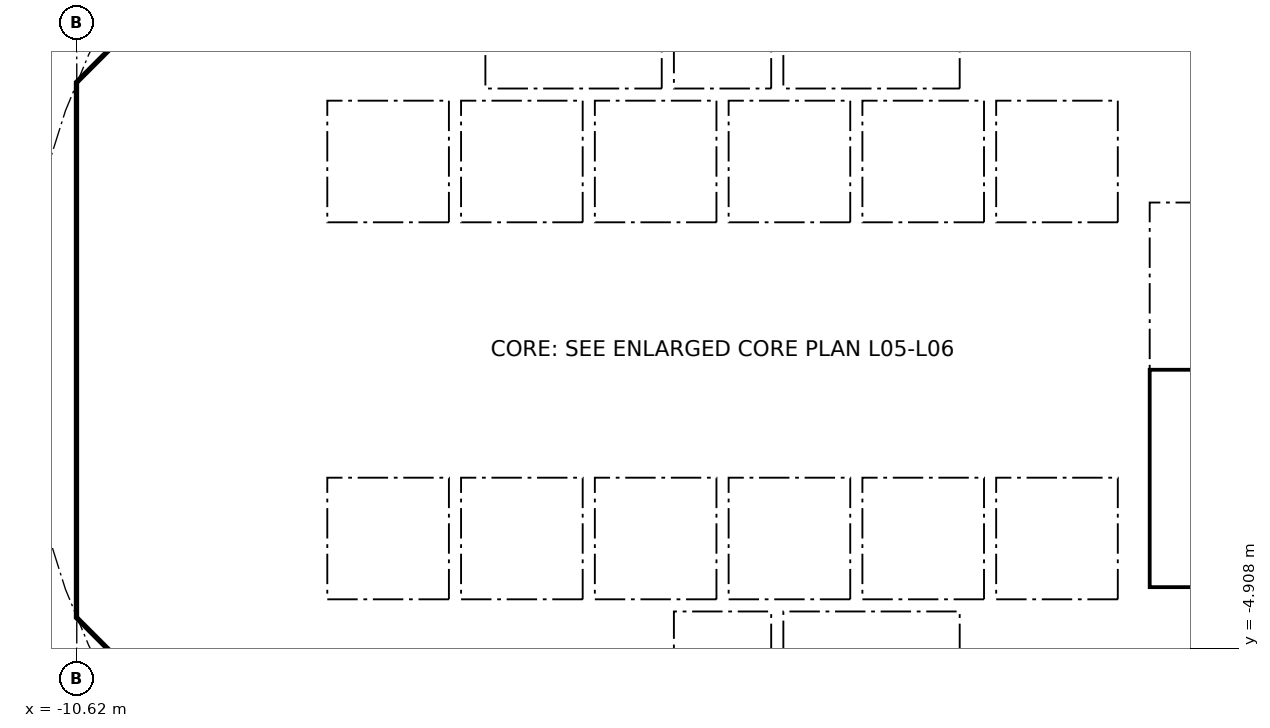
"""IFC4 building model, lengths in metres.
Left out: names, types, materials, properties, quantities, classifications, styles, units other than length and angle.
Written with IfcOpenShell. Run it as: python <this file> out.ifc"""

import sys

from ifc_helpers import new_model, si_unit, direction, frame, frame_2d, origin, place, context, subcontext, project, spatial, polyline, rectangle, outline, extrude, element, fill, save


model = new_model("IFC4")
c1 = context("Model", 3, precision=1e-05, world=origin(), true_north=direction((0.0, 1.0)))
c2 = subcontext(c1, "Body", "Model", "MODEL_VIEW")
j1 = project(units=[si_unit("LENGTHUNIT", "METRE"), si_unit("PLANEANGLEUNIT", "RADIAN")], contexts=[c1])
p1 = place(None, origin())
s1 = spatial("IfcSite", under=j1, at=p1, CompositionType="ELEMENT")
p2 = place(p1, origin())
s2 = spatial("IfcBuilding", under=s1, at=p2, CompositionType="ELEMENT")
p3 = place(p2, frame((0.0, 0.0, 30.7)))
s3 = spatial("IfcBuildingStorey", under=s2, at=p3, CompositionType="ELEMENT", Elevation=30.7)
p4 = place(p3, frame((9.988, 4.613, 0.0), z_axis=(0.0, 0.0, 1.0), x_axis=(-0.707106781187, 0.707106781187, 0.0)))
e1 = element("IfcWall", 1, at=p4, inside=s3, PredefinedType="SHEAR", context=c2, shape_type="SweptSolid", body=[
    extrude(rectangle(XDim=7.602, YDim=0.6, at=frame_2d((3.801, 0.0))), origin(), (0.0, 0.0, 1.0), 3.44),
])
p5 = place(p4, frame((3.201, 0.0, 0.0)))
e2 = element("IfcOpeningElement", 2, at=p5, cuts=e1, PredefinedType="OPENING", context=c2, shape_type="SweptSolid", body=[
    extrude(rectangle(XDim=1.2, YDim=2.1, at=frame_2d((0.6, 1.05))), frame((0.0, 0.31, 0.0), z_axis=(0.0, -1.0, 0.0), x_axis=(1.0, 0.0, 0.0)), (0.0, 0.0, 1.0), 0.62),
])
p6 = place(p3, frame((-4.613, 9.988, 0.0), z_axis=(0.0, 0.0, 1.0), x_axis=(-0.707106781187, -0.707106781187, 0.0)))
e3 = element("IfcWall", 3, at=p6, inside=s3, PredefinedType="SHEAR", context=c2, shape_type="SweptSolid", body=[
    extrude(rectangle(XDim=7.602, YDim=0.6, at=frame_2d((3.801, 0.0))), origin(), (0.0, 0.0, 1.0), 3.44),
])
p7 = place(p6, frame((0.351, 0.0, 0.0)))
e4 = element("IfcOpeningElement", 4, at=p7, cuts=e3, PredefinedType="OPENING", context=c2, shape_type="SweptSolid", body=[
    extrude(rectangle(XDim=1.1, YDim=2.1, at=frame_2d((0.55, 1.05))), frame((0.0, 0.31, 0.0), z_axis=(0.0, -1.0, 0.0), x_axis=(1.0, 0.0, 0.0)), (0.0, 0.0, 1.0), 0.62),
])
p8 = place(p3, frame((-10.325, 3.801, 0.0), z_axis=(0.0, 0.0, 1.0), x_axis=(0.0, -1.0, 0.0)))
e5 = element("IfcWall", 5, at=p8, inside=s3, PredefinedType="SHEAR", context=c2, shape_type="SweptSolid", body=[
    extrude(rectangle(XDim=7.602, YDim=0.6, at=frame_2d((3.801, 0.0))), origin(), (0.0, 0.0, 1.0), 3.44),
])
p9 = place(p8, frame((0.651, 0.0, 0.0)))
e6 = element("IfcOpeningElement", 6, at=p9, cuts=e5, PredefinedType="OPENING", context=c2, shape_type="SweptSolid", body=[
    extrude(rectangle(XDim=1.5, YDim=2.1, at=frame_2d((0.75, 1.05))), frame((0.0, 0.31, 0.0), z_axis=(0.0, -1.0, 0.0), x_axis=(1.0, 0.0, 0.0)), (0.0, 0.0, 1.0), 0.62),
])
p10 = place(p8, frame((5.451, 0.0, 0.0)))
e7 = element("IfcOpeningElement", 7, at=p10, cuts=e5, PredefinedType="OPENING", context=c2, shape_type="SweptSolid", body=[
    extrude(rectangle(XDim=1.5, YDim=2.1, at=frame_2d((0.75, 1.05))), frame((0.0, 0.31, 0.0), z_axis=(0.0, -1.0, 0.0), x_axis=(1.0, 0.0, 0.0)), (0.0, 0.0, 1.0), 0.62),
])
p11 = place(p3, frame((-9.988, -4.613, 0.0), z_axis=(0.0, 0.0, 1.0), x_axis=(0.707106781187, -0.707106781187, 0.0)))
e8 = element("IfcWall", 8, at=p11, inside=s3, PredefinedType="SHEAR", context=c2, shape_type="SweptSolid", body=[
    extrude(rectangle(XDim=7.602, YDim=0.6, at=frame_2d((3.801, 0.0))), origin(), (0.0, 0.0, 1.0), 3.44),
])
p12 = place(p11, frame((6.151, 0.0, 0.0)))
e9 = element("IfcOpeningElement", 9, at=p12, cuts=e8, PredefinedType="OPENING", context=c2, shape_type="SweptSolid", body=[
    extrude(rectangle(XDim=1.1, YDim=2.1, at=frame_2d((0.55, 1.05))), frame((0.0, 0.31, 0.0), z_axis=(0.0, -1.0, 0.0), x_axis=(1.0, 0.0, 0.0)), (0.0, 0.0, 1.0), 0.62),
])
p13 = place(p3, frame((4.613, -9.988, 0.0), z_axis=(0.0, 0.0, 1.0), x_axis=(0.707106781187, 0.707106781187, 0.0)))
e10 = element("IfcWall", 10, at=p13, inside=s3, PredefinedType="SHEAR", context=c2, shape_type="SweptSolid", body=[
    extrude(rectangle(XDim=7.602, YDim=0.6, at=frame_2d((3.801, 0.0))), origin(), (0.0, 0.0, 1.0), 3.44),
])
p14 = place(p13, frame((3.201, 0.0, 0.0)))
e11 = element("IfcOpeningElement", 11, at=p14, cuts=e10, PredefinedType="OPENING", context=c2, shape_type="SweptSolid", body=[
    extrude(rectangle(XDim=1.2, YDim=2.1, at=frame_2d((0.6, 1.05))), frame((0.0, 0.31, 0.0), z_axis=(0.0, -1.0, 0.0), x_axis=(1.0, 0.0, 0.0)), (0.0, 0.0, 1.0), 0.62),
])
p15 = place(p3, frame((-5.8, 4.3, 0.0), z_axis=(0.0, 0.0, 1.0), x_axis=(0.0, 1.0, 0.0)))
e12 = element("IfcWall", 12, at=p15, inside=s3, PredefinedType="PARTITIONING", context=c2, shape_type="SweptSolid", body=[
    extrude(rectangle(XDim=3.927, YDim=0.15, at=frame_2d((1.963, 0.0))), origin(), (0.0, 0.0, 1.0), 3.44),
])
p16 = place(p15, frame((0.413, 0.0, 0.0)))
e13 = element("IfcOpeningElement", 13, at=p16, cuts=e12, PredefinedType="OPENING", context=c2, shape_type="SweptSolid", body=[
    extrude(rectangle(XDim=0.9, YDim=2.1, at=frame_2d((0.45, 1.05))), frame((0.0, 0.085, 0.0), z_axis=(0.0, -1.0, 0.0), x_axis=(1.0, 0.0, 0.0)), (0.0, 0.0, 1.0), 0.17),
])
p17 = place(p15, frame((2.489, 0.0, 0.0)))
e14 = element("IfcOpeningElement", 14, at=p17, cuts=e12, PredefinedType="OPENING", context=c2, shape_type="SweptSolid", body=[
    extrude(rectangle(XDim=0.9, YDim=2.1, at=frame_2d((0.45, 1.05))), frame((0.0, 0.085, 0.0), z_axis=(0.0, -1.0, 0.0), x_axis=(1.0, 0.0, 0.0)), (0.0, 0.0, 1.0), 0.17),
])
p18 = place(p3, frame((4.0, 4.3, 0.0), z_axis=(0.0, 0.0, 1.0), x_axis=(0.0, 1.0, 0.0)))
e15 = element("IfcWall", 15, at=p18, inside=s3, PredefinedType="SOLIDWALL", context=c2, shape_type="SweptSolid", body=[
    extrude(rectangle(XDim=2.2, YDim=0.2, at=frame_2d((1.1, 0.0))), origin(), (0.0, 0.0, 1.0), 3.44),
])
p19 = place(p18, frame((0.55, 0.0, 0.0)))
e16 = element("IfcOpeningElement", 16, at=p19, cuts=e15, PredefinedType="OPENING", context=c2, shape_type="SweptSolid", body=[
    extrude(rectangle(XDim=1.1, YDim=2.1, at=frame_2d((0.55, 1.05))), frame((0.0, 0.11, 0.0), z_axis=(0.0, -1.0, 0.0), x_axis=(1.0, 0.0, 0.0)), (0.0, 0.0, 1.0), 0.22),
])
p20 = place(p3, frame((-4.0, 4.3, 0.0), z_axis=(0.0, 0.0, 1.0), x_axis=(0.0, 1.0, 0.0)))
e17 = element("IfcWall", 17, at=p20, inside=s3, PredefinedType="SOLIDWALL", context=c2, shape_type="SweptSolid", body=[
    extrude(rectangle(XDim=2.2, YDim=0.2, at=frame_2d((1.1, 0.0))), origin(), (0.0, 0.0, 1.0), 3.44),
])
p21 = place(p20, frame((0.55, 0.0, 0.0)))
e18 = element("IfcOpeningElement", 18, at=p21, cuts=e17, PredefinedType="OPENING", context=c2, shape_type="SweptSolid", body=[
    extrude(rectangle(XDim=1.1, YDim=2.1, at=frame_2d((0.55, 1.05))), frame((0.0, 0.11, 0.0), z_axis=(0.0, -1.0, 0.0), x_axis=(1.0, 0.0, 0.0)), (0.0, 0.0, 1.0), 0.22),
])
p22 = place(p3, frame((-6.7, 2.0, 0.0), z_axis=(0.0, 0.0, 1.0), x_axis=(1.0, 0.0, 0.0)))
e19 = element("IfcWall", 19, at=p22, inside=s3, PredefinedType="SOLIDWALL", context=c2, shape_type="SweptSolid", body=[
    extrude(rectangle(XDim=13.4, YDim=0.2, at=frame_2d((6.7, 0.0))), origin(), (0.0, 0.0, 1.0), 3.44),
])
p23 = place(p22, frame((0.65, 0.0, 0.0)))
e20 = element("IfcOpeningElement", 20, at=p23, cuts=e19, PredefinedType="OPENING", context=c2, shape_type="SweptSolid", body=[
    extrude(rectangle(XDim=1.1, YDim=2.1, at=frame_2d((0.55, 1.05))), frame((0.0, 0.11, 0.0), z_axis=(0.0, -1.0, 0.0), x_axis=(1.0, 0.0, 0.0)), (0.0, 0.0, 1.0), 0.22),
])
p24 = place(p22, frame((2.85, 0.0, 0.0)))
e21 = element("IfcOpeningElement", 21, at=p24, cuts=e19, PredefinedType="OPENING", context=c2, shape_type="SweptSolid", body=[
    extrude(rectangle(XDim=1.1, YDim=2.1, at=frame_2d((0.55, 1.05))), frame((0.0, 0.11, 0.0), z_axis=(0.0, -1.0, 0.0), x_axis=(1.0, 0.0, 0.0)), (0.0, 0.0, 1.0), 0.22),
])
p25 = place(p22, frame((5.05, 0.0, 0.0)))
e22 = element("IfcOpeningElement", 22, at=p25, cuts=e19, PredefinedType="OPENING", context=c2, shape_type="SweptSolid", body=[
    extrude(rectangle(XDim=1.1, YDim=2.1, at=frame_2d((0.55, 1.05))), frame((0.0, 0.11, 0.0), z_axis=(0.0, -1.0, 0.0), x_axis=(1.0, 0.0, 0.0)), (0.0, 0.0, 1.0), 0.22),
])
p26 = place(p3, frame((6.7, 4.0, 0.0), z_axis=(0.0, 0.0, 1.0), x_axis=(1.0, 0.0, 0.0)))
e23 = element("IfcWall", 23, at=p26, inside=s3, PredefinedType="SOLIDWALL", context=c2, shape_type="SweptSolid", body=[
    extrude(rectangle(XDim=3.325, YDim=0.2, at=frame_2d((1.662, 0.0))), origin(), (0.0, 0.0, 1.0), 3.44),
])
p27 = place(p26, frame((1.25, 0.0, 0.0)))
e24 = element("IfcOpeningElement", 24, at=p27, cuts=e23, PredefinedType="OPENING", context=c2, shape_type="SweptSolid", body=[
    extrude(rectangle(XDim=1.1, YDim=2.1, at=frame_2d((0.55, 1.05))), frame((0.0, 0.11, 0.0), z_axis=(0.0, -1.0, 0.0), x_axis=(1.0, 0.0, 0.0)), (0.0, 0.0, 1.0), 0.22),
])
p28 = place(p3, frame((-5.8, -8.227, 0.0), z_axis=(0.0, 0.0, 1.0), x_axis=(0.0, 1.0, 0.0)))
e25 = element("IfcWall", 25, at=p28, inside=s3, PredefinedType="PARTITIONING", context=c2, shape_type="SweptSolid", body=[
    extrude(rectangle(XDim=3.927, YDim=0.15, at=frame_2d((1.963, 0.0))), origin(), (0.0, 0.0, 1.0), 3.44),
])
p29 = place(p28, frame((2.615, 0.0, 0.0)))
e26 = element("IfcOpeningElement", 26, at=p29, cuts=e25, PredefinedType="OPENING", context=c2, shape_type="SweptSolid", body=[
    extrude(rectangle(XDim=0.9, YDim=2.1, at=frame_2d((0.45, 1.05))), frame((0.0, 0.085, 0.0), z_axis=(0.0, -1.0, 0.0), x_axis=(1.0, 0.0, 0.0)), (0.0, 0.0, 1.0), 0.17),
])
p30 = place(p28, frame((0.539, 0.0, 0.0)))
e27 = element("IfcOpeningElement", 27, at=p30, cuts=e25, PredefinedType="OPENING", context=c2, shape_type="SweptSolid", body=[
    extrude(rectangle(XDim=0.9, YDim=2.1, at=frame_2d((0.45, 1.05))), frame((0.0, 0.085, 0.0), z_axis=(0.0, -1.0, 0.0), x_axis=(1.0, 0.0, 0.0)), (0.0, 0.0, 1.0), 0.17),
])
p31 = place(p3, frame((4.0, -6.5, 0.0), z_axis=(0.0, 0.0, 1.0), x_axis=(0.0, 1.0, 0.0)))
e28 = element("IfcWall", 28, at=p31, inside=s3, PredefinedType="SOLIDWALL", context=c2, shape_type="SweptSolid", body=[
    extrude(rectangle(XDim=2.2, YDim=0.2, at=frame_2d((1.1, 0.0))), origin(), (0.0, 0.0, 1.0), 3.44),
])
p32 = place(p31, frame((0.55, 0.0, 0.0)))
e29 = element("IfcOpeningElement", 29, at=p32, cuts=e28, PredefinedType="OPENING", context=c2, shape_type="SweptSolid", body=[
    extrude(rectangle(XDim=1.1, YDim=2.1, at=frame_2d((0.55, 1.05))), frame((0.0, 0.11, 0.0), z_axis=(0.0, -1.0, 0.0), x_axis=(1.0, 0.0, 0.0)), (0.0, 0.0, 1.0), 0.22),
])
p33 = place(p3, frame((-4.0, -6.5, 0.0), z_axis=(0.0, 0.0, 1.0), x_axis=(0.0, 1.0, 0.0)))
e30 = element("IfcWall", 30, at=p33, inside=s3, PredefinedType="SOLIDWALL", context=c2, shape_type="SweptSolid", body=[
    extrude(rectangle(XDim=2.2, YDim=0.2, at=frame_2d((1.1, 0.0))), origin(), (0.0, 0.0, 1.0), 3.44),
])
p34 = place(p33, frame((0.65, 0.0, 0.0)))
e31 = element("IfcOpeningElement", 31, at=p34, cuts=e30, PredefinedType="OPENING", context=c2, shape_type="SweptSolid", body=[
    extrude(rectangle(XDim=0.9, YDim=2.1, at=frame_2d((0.45, 1.05))), frame((0.0, 0.11, 0.0), z_axis=(0.0, -1.0, 0.0), x_axis=(1.0, 0.0, 0.0)), (0.0, 0.0, 1.0), 0.22),
])
p35 = place(p3, frame((-6.7, -2.0, 0.0), z_axis=(0.0, 0.0, 1.0), x_axis=(1.0, 0.0, 0.0)))
e32 = element("IfcWall", 32, at=p35, inside=s3, PredefinedType="SOLIDWALL", context=c2, shape_type="SweptSolid", body=[
    extrude(rectangle(XDim=13.4, YDim=0.2, at=frame_2d((6.7, 0.0))), origin(), (0.0, 0.0, 1.0), 3.44),
])
p36 = place(p35, frame((0.65, 0.0, 0.0)))
e33 = element("IfcOpeningElement", 33, at=p36, cuts=e32, PredefinedType="OPENING", context=c2, shape_type="SweptSolid", body=[
    extrude(rectangle(XDim=1.1, YDim=2.1, at=frame_2d((0.55, 1.05))), frame((0.0, 0.11, 0.0), z_axis=(0.0, -1.0, 0.0), x_axis=(1.0, 0.0, 0.0)), (0.0, 0.0, 1.0), 0.22),
])
p37 = place(p35, frame((2.85, 0.0, 0.0)))
e34 = element("IfcOpeningElement", 34, at=p37, cuts=e32, PredefinedType="OPENING", context=c2, shape_type="SweptSolid", body=[
    extrude(rectangle(XDim=1.1, YDim=2.1, at=frame_2d((0.55, 1.05))), frame((0.0, 0.11, 0.0), z_axis=(0.0, -1.0, 0.0), x_axis=(1.0, 0.0, 0.0)), (0.0, 0.0, 1.0), 0.22),
])
p38 = place(p3, origin())
e35 = element("IfcWall", 35, at=p38, inside=s3, PredefinedType="SHEAR", context=c2, shape_type="SweptSolid", body=[
    extrude(outline(polyline([(-10.625, -3.801), (-10.025, -3.801), (-10.025, -4.152), (-9.776, -4.401), (-10.2, -4.825), (-10.625, -4.401), (-10.625, -3.801)])), origin(), (0.0, 0.0, 1.0), 3.44),
])
p39 = place(p3, origin())
e36 = element("IfcWall", 36, at=p39, inside=s3, PredefinedType="SHEAR", context=c2, shape_type="SweptSolid", body=[
    extrude(outline(polyline([(-10.2, 4.825), (-9.776, 4.401), (-10.025, 4.152), (-10.025, 3.801), (-10.625, 3.801), (-10.625, 4.401), (-10.2, 4.825)])), origin(), (0.0, 0.0, 1.0), 3.44),
])
for number, where, z_axis, x_axis in (
    (37, (-10.025, -4.0, 0.0), (0.0, 0.0, 1.0), (1.0, 0.0, 0.0)),
    (38, (-10.025, 4.0, 0.0), (0.0, 0.0, 1.0), (1.0, 0.0, 0.0)),
):
    element("IfcWall", number, at=place(p3, frame(where, z_axis=z_axis, x_axis=x_axis)), inside=s3, PredefinedType="PARTITIONING", context=c2, shape_type="SweptSolid", body=[
        extrude(rectangle(XDim=3.325, YDim=0.2, at=frame_2d((1.662, 0.0))), origin(), (0.0, 0.0, 1.0), 3.44),
    ])
for number, where, z_axis, x_axis in (
    (39, (-0.9, -6.5, 0.0), (0.0, 0.0, 1.0), (0.0, 1.0, 0.0)),
    (40, (0.9, -6.5, 0.0), (0.0, 0.0, 1.0), (0.0, 1.0, 0.0)),
):
    element("IfcWall", number, at=place(p3, frame(where, z_axis=z_axis, x_axis=x_axis)), inside=s3, PredefinedType="SOLIDWALL", context=c2, shape_type="SweptSolid", body=[
        extrude(rectangle(XDim=2.2, YDim=0.2, at=frame_2d((1.1, 0.0))), origin(), (0.0, 0.0, 1.0), 3.44),
    ])
p40 = place(p3, origin())
e41 = element("IfcWall", 41, at=p40, inside=s3, PredefinedType="SOLIDWALL", context=c2, shape_type="SweptSolid", body=[
    extrude(outline(polyline([(-6.7, -2.1), (-6.5, -2.1), (-6.5, -4.1), (-4.5, -4.1), (-4.5, -2.1), (-4.3, -2.1), (-4.3, -4.1), (-2.3, -4.1), (-2.3, -2.1), (-2.1, -2.1), (-2.1, -4.1), (-0.1, -4.1), (-0.1, -2.1), (0.1, -2.1), (0.1, -4.1), (2.1, -4.1), (2.1, -2.1), (2.3, -2.1), (2.3, -4.1), (4.3, -4.1), (4.3, -2.1), (4.5, -2.1), (4.5, -4.1), (6.5, -4.1), (6.5, -2.1), (6.7, -2.1), (6.7, -4.3), (-6.7, -4.3), (-6.7, -2.1)])), origin(), (0.0, 0.0, 1.0), 3.44),
])
for number, where, z_axis, x_axis in (
    (42, (-0.9, 4.3, 0.0), (0.0, 0.0, 1.0), (0.0, 1.0, 0.0)),
    (43, (0.9, 4.3, 0.0), (0.0, 0.0, 1.0), (0.0, 1.0, 0.0)),
):
    element("IfcWall", number, at=place(p3, frame(where, z_axis=z_axis, x_axis=x_axis)), inside=s3, PredefinedType="SOLIDWALL", context=c2, shape_type="SweptSolid", body=[
        extrude(rectangle(XDim=2.2, YDim=0.2, at=frame_2d((1.1, 0.0))), origin(), (0.0, 0.0, 1.0), 3.44),
    ])
p41 = place(p3, origin())
e44 = element("IfcWall", 44, at=p41, inside=s3, PredefinedType="SOLIDWALL", context=c2, shape_type="SweptSolid", body=[
    extrude(outline(polyline([(-6.5, 2.1), (-6.7, 2.1), (-6.7, 4.3), (6.7, 4.3), (6.7, 2.1), (6.5, 2.1), (6.5, 4.1), (4.5, 4.1), (4.5, 2.1), (4.3, 2.1), (4.3, 4.1), (2.3, 4.1), (2.3, 2.1), (2.1, 2.1), (2.1, 4.1), (0.1, 4.1), (0.1, 2.1), (-0.1, 2.1), (-0.1, 4.1), (-2.1, 4.1), (-2.1, 2.1), (-2.3, 2.1), (-2.3, 4.1), (-4.3, 4.1), (-4.3, 2.1), (-4.5, 2.1), (-4.5, 4.1), (-6.5, 4.1), (-6.5, 2.1)])), origin(), (0.0, 0.0, 1.0), 3.44),
])
p42 = place(p3, origin())
e45 = element("IfcWall", 45, at=p42, inside=s3, PredefinedType="SOLIDWALL", context=c2, shape_type="SweptSolid", body=[
    extrude(outline(polyline([(7.025, -3.9), (6.7, -3.9), (6.7, 3.9), (7.025, 3.9), (7.025, -3.9)])), origin(), (0.0, 0.0, 1.0), 3.44),
])
p43 = place(p3, origin())
e46 = element("IfcWall", 46, at=p43, inside=s3, PredefinedType="SOLIDWALL", context=c2, shape_type="SweptSolid", body=[
    extrude(outline(polyline([(10.025, -4.1), (6.7, -4.1), (6.7, -3.9), (10.025, -3.9), (10.025, -4.1)])), origin(), (0.0, 0.0, 1.0), 3.44),
])
p44 = place(p23, origin())
e47 = element("IfcDoor", 47, at=p44, inside=s3, OperationType="DOUBLE_DOOR_SLIDING", PredefinedType="DOOR", context=c2, shape_type="SweptSolid", body=[
    extrude(rectangle(XDim=1.1, YDim=2.1, at=frame_2d((0.55, 1.05))), frame((0.0, 0.025, 0.0), z_axis=(0.0, -1.0, 0.0), x_axis=(1.0, 0.0, 0.0)), (0.0, 0.0, 1.0), 0.05),
])
fill(e20, e47)
p45 = place(p24, origin())
e48 = element("IfcDoor", 48, at=p45, inside=s3, OperationType="DOUBLE_DOOR_SLIDING", PredefinedType="DOOR", context=c2, shape_type="SweptSolid", body=[
    extrude(rectangle(XDim=1.1, YDim=2.1, at=frame_2d((0.55, 1.05))), frame((0.0, 0.025, 0.0), z_axis=(0.0, -1.0, 0.0), x_axis=(1.0, 0.0, 0.0)), (0.0, 0.0, 1.0), 0.05),
])
fill(e21, e48)
p46 = place(p25, origin())
e49 = element("IfcDoor", 49, at=p46, inside=s3, OperationType="DOUBLE_DOOR_SLIDING", PredefinedType="DOOR", context=c2, shape_type="SweptSolid", body=[
    extrude(rectangle(XDim=1.1, YDim=2.1, at=frame_2d((0.55, 1.05))), frame((0.0, 0.025, 0.0), z_axis=(0.0, -1.0, 0.0), x_axis=(1.0, 0.0, 0.0)), (0.0, 0.0, 1.0), 0.05),
])
fill(e22, e49)
p47 = place(p36, origin())
e50 = element("IfcDoor", 50, at=p47, inside=s3, OperationType="DOUBLE_DOOR_SLIDING", PredefinedType="DOOR", context=c2, shape_type="SweptSolid", body=[
    extrude(rectangle(XDim=1.1, YDim=2.1, at=frame_2d((0.55, 1.05))), frame((0.0, 0.025, 0.0), z_axis=(0.0, -1.0, 0.0), x_axis=(1.0, 0.0, 0.0)), (0.0, 0.0, 1.0), 0.05),
])
fill(e33, e50)
p48 = place(p37, origin())
e51 = element("IfcDoor", 51, at=p48, inside=s3, OperationType="DOUBLE_DOOR_SLIDING", PredefinedType="DOOR", context=c2, shape_type="SweptSolid", body=[
    extrude(rectangle(XDim=1.1, YDim=2.1, at=frame_2d((0.55, 1.05))), frame((0.0, 0.025, 0.0), z_axis=(0.0, -1.0, 0.0), x_axis=(1.0, 0.0, 0.0)), (0.0, 0.0, 1.0), 0.05),
])
fill(e34, e51)
p49 = place(p19, origin())
e52 = element("IfcDoor", 52, at=p49, inside=s3, OperationType="DOUBLE_DOOR_SLIDING", PredefinedType="DOOR", context=c2, shape_type="SweptSolid", body=[
    extrude(rectangle(XDim=1.1, YDim=2.1, at=frame_2d((0.55, 1.05))), frame((0.0, 0.025, 0.0), z_axis=(0.0, -1.0, 0.0), x_axis=(1.0, 0.0, 0.0)), (0.0, 0.0, 1.0), 0.05),
])
fill(e16, e52)
p50 = place(p32, origin())
e53 = element("IfcDoor", 53, at=p50, inside=s3, OperationType="DOUBLE_DOOR_SLIDING", PredefinedType="DOOR", context=c2, shape_type="SweptSolid", body=[
    extrude(rectangle(XDim=1.1, YDim=2.1, at=frame_2d((0.55, 1.05))), frame((0.0, 0.025, 0.0), z_axis=(0.0, -1.0, 0.0), x_axis=(1.0, 0.0, 0.0)), (0.0, 0.0, 1.0), 0.05),
])
fill(e29, e53)
p51 = place(p21, origin())
e54 = element("IfcDoor", 54, at=p51, inside=s3, OperationType="DOUBLE_DOOR_SLIDING", PredefinedType="DOOR", context=c2, shape_type="SweptSolid", body=[
    extrude(rectangle(XDim=1.1, YDim=2.1, at=frame_2d((0.55, 1.05))), frame((0.0, 0.025, 0.0), z_axis=(0.0, -1.0, 0.0), x_axis=(1.0, 0.0, 0.0)), (0.0, 0.0, 1.0), 0.05),
])
fill(e18, e54)
p52 = place(p16, origin())
e55 = element("IfcDoor", 55, at=p52, inside=s3, OperationType="SINGLE_SWING_LEFT", PredefinedType="DOOR", context=c2, shape_type="SweptSolid", body=[
    extrude(rectangle(XDim=0.9, YDim=2.1, at=frame_2d((0.45, 1.05))), frame((0.0, 0.025, 0.0), z_axis=(0.0, -1.0, 0.0), x_axis=(1.0, 0.0, 0.0)), (0.0, 0.0, 1.0), 0.05),
])
fill(e13, e55)
p53 = place(p29, origin())
e56 = element("IfcDoor", 56, at=p53, inside=s3, OperationType="SINGLE_SWING_LEFT", PredefinedType="DOOR", context=c2, shape_type="SweptSolid", body=[
    extrude(rectangle(XDim=0.9, YDim=2.1, at=frame_2d((0.45, 1.05))), frame((0.0, 0.025, 0.0), z_axis=(0.0, -1.0, 0.0), x_axis=(1.0, 0.0, 0.0)), (0.0, 0.0, 1.0), 0.05),
])
fill(e26, e56)
p54 = place(p9, origin())
e57 = element("IfcDoor", 57, at=p54, inside=s3, OperationType="DOUBLE_DOOR_SINGLE_SWING", PredefinedType="DOOR", context=c2, shape_type="SweptSolid", body=[
    extrude(rectangle(XDim=1.5, YDim=2.1, at=frame_2d((0.75, 1.05))), frame((0.0, 0.025, 0.0), z_axis=(0.0, -1.0, 0.0), x_axis=(1.0, 0.0, 0.0)), (0.0, 0.0, 1.0), 0.05),
])
fill(e6, e57)
p55 = place(p10, origin())
e58 = element("IfcDoor", 58, at=p55, inside=s3, OperationType="DOUBLE_DOOR_SINGLE_SWING", PredefinedType="DOOR", context=c2, shape_type="SweptSolid", body=[
    extrude(rectangle(XDim=1.5, YDim=2.1, at=frame_2d((0.75, 1.05))), frame((0.0, 0.025, 0.0), z_axis=(0.0, -1.0, 0.0), x_axis=(1.0, 0.0, 0.0)), (0.0, 0.0, 1.0), 0.05),
])
fill(e7, e58)
save(model, sys.argv[1])
